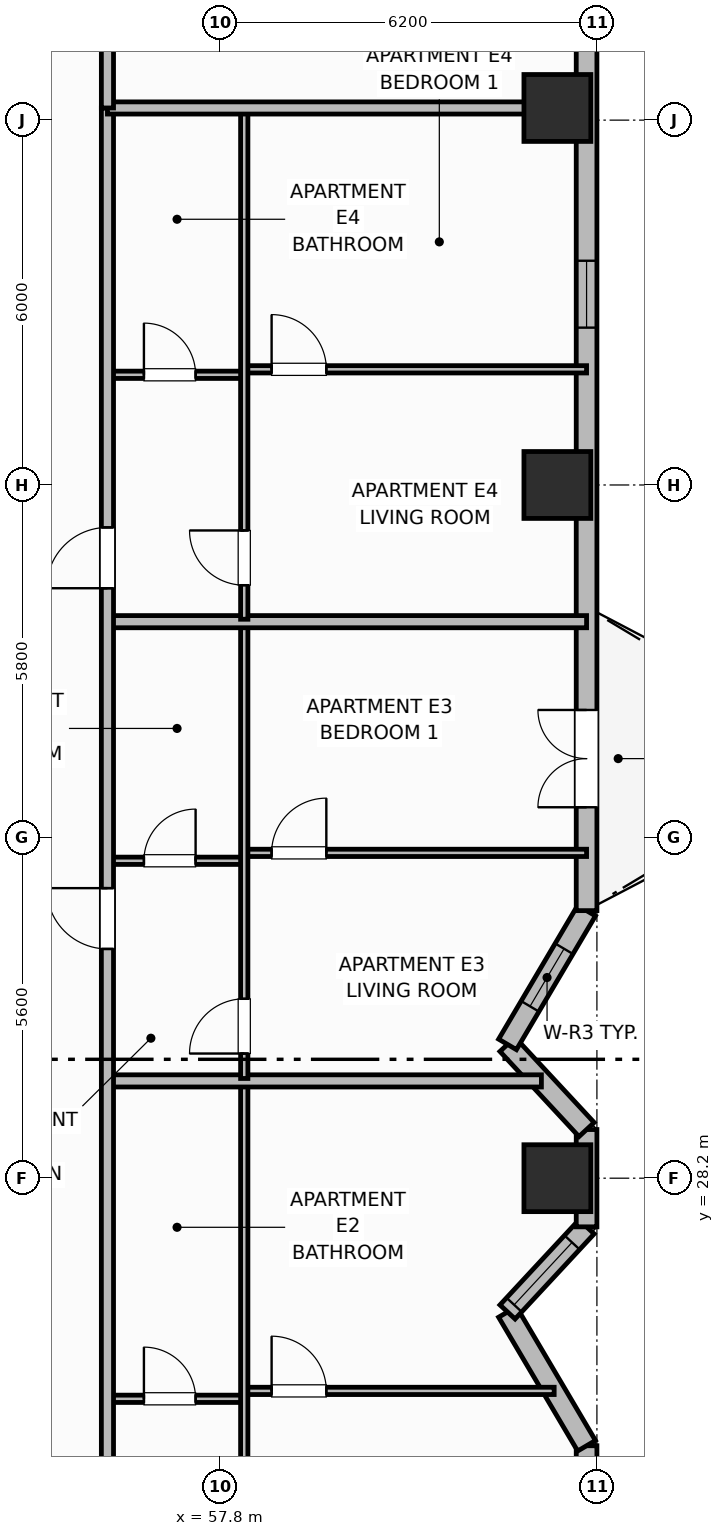
"""IFC4 building model, lengths in metres.
Left out: names, types, materials, properties, quantities, classifications, styles, units other than length and angle.
Written with IfcOpenShell. Run it as: python <this file> out.ifc"""

import sys

from ifc_helpers import new_model, si_unit, direction, frame, frame_2d, origin, origin_2d, place, context, subcontext, project, spatial, rectangle, extrude, element, fill, save


model = new_model("IFC4")
c1 = context("Model", 3, precision=1e-05, world=origin(), true_north=direction((0.0, 1.0)))
c2 = subcontext(c1, "Body", "Model", "MODEL_VIEW")
j1 = project(units=[si_unit("LENGTHUNIT", "METRE"), si_unit("PLANEANGLEUNIT", "RADIAN")], contexts=[c1])
p1 = place(None, origin())
s1 = spatial("IfcSite", under=j1, at=p1, CompositionType="ELEMENT")
p2 = place(p1, origin())
s2 = spatial("IfcBuilding", under=s1, at=p2, CompositionType="ELEMENT")
p3 = place(p2, frame((0.0, 0.0, 106.8)))
s3 = spatial("IfcBuildingStorey", under=s2, at=p3, CompositionType="ELEMENT", Elevation=106.8)
for number, where, z_axis, x_axis in (
    (1, (63.35, 28.2, 0.0), (0.0, 0.0, 1.0), (1.0, 0.0, 0.0)),
    (2, (63.35, 39.6, 0.0), (0.0, 0.0, 1.0), (1.0, 0.0, 0.0)),
    (3, (63.35, 45.8, 0.0), (0.0, 0.0, 1.0), (1.0, 0.0, 0.0)),
):
    element("IfcColumn", number, at=place(p3, frame(where, z_axis=z_axis, x_axis=x_axis)), inside=s3, PredefinedType="COLUMN", context=c2, shape_type="SweptSolid", body=[
        extrude(rectangle(XDim=1.1, YDim=1.1, at=origin_2d()), origin(), (0.0, 0.0, 1.0), 3.7),
    ])
p4 = place(p3, frame((63.83, 9.0, 0.0), z_axis=(0.0, 0.0, 1.0), x_axis=(0.0, 1.0, 0.0)))
e4 = element("IfcWall", 4, at=p4, inside=s3, PredefinedType="SOLIDWALL", context=c2, shape_type="SweptSolid", body=[
    extrude(rectangle(XDim=14.8, YDim=0.34, at=frame_2d((7.4, 0.0))), origin(), (0.0, 0.0, 1.0), 2.7),
])
p5 = place(p4, frame((4.312, 0.0, 0.73)))
e5 = element("IfcOpeningElement", 5, at=p5, cuts=e4, PredefinedType="OPENING", context=c2, shape_type="SweptSolid", body=[
    extrude(rectangle(XDim=1.4, YDim=1.85, at=frame_2d((0.7, 0.925))), frame((0.0, 0.18, 0.0), z_axis=(0.0, -1.0, 0.0), x_axis=(1.0, 0.0, 0.0)), (0.0, 0.0, 1.0), 0.36),
])
p6 = place(p4, frame((8.44, 0.0, 0.69)))
e6 = element("IfcOpeningElement", 6, at=p6, cuts=e4, PredefinedType="OPENING", context=c2, shape_type="SweptSolid", body=[
    extrude(rectangle(XDim=1.4, YDim=1.85, at=frame_2d((0.7, 0.925))), frame((0.0, 0.18, 0.0), z_axis=(0.0, -1.0, 0.0), x_axis=(1.0, 0.0, 0.0)), (0.0, 0.0, 1.0), 0.36),
])
p7 = place(p4, frame((11.762, 0.0, 0.73)))
e7 = element("IfcOpeningElement", 7, at=p7, cuts=e4, PredefinedType="OPENING", context=c2, shape_type="SweptSolid", body=[
    extrude(rectangle(XDim=1.4, YDim=1.85, at=frame_2d((0.7, 0.925))), frame((0.0, 0.18, 0.0), z_axis=(0.0, -1.0, 0.0), x_axis=(1.0, 0.0, 0.0)), (0.0, 0.0, 1.0), 0.36),
])
p8 = place(p3, frame((63.83, 23.8, 0.0), z_axis=(0.0, 0.0, 1.0), x_axis=(-0.508751843651, 0.860913213734, 0.0)))
e8 = element("IfcWall", 8, at=p8, inside=s3, PredefinedType="SOLIDWALL", context=c2, shape_type="SweptSolid", body=[
    extrude(rectangle(XDim=2.555, YDim=0.34, at=frame_2d((1.278, 0.0))), origin(), (0.0, 0.0, 1.0), 2.7),
])
p9 = place(p3, frame((62.53, 26.0, 0.0), z_axis=(0.0, 0.0, 1.0), x_axis=(0.68049031116, 0.732757078722, 0.0)))
e9 = element("IfcWall", 9, at=p9, inside=s3, PredefinedType="SOLIDWALL", context=c2, shape_type="SweptSolid", body=[
    extrude(rectangle(XDim=1.91, YDim=0.34, at=frame_2d((0.955, 0.0))), origin(), (0.0, 0.0, 1.0), 2.7),
])
p10 = place(p9, frame((0.16, 0.0, 0.69)))
e10 = element("IfcOpeningElement", 10, at=p10, cuts=e9, PredefinedType="OPENING", context=c2, shape_type="SweptSolid", body=[
    extrude(rectangle(XDim=1.4, YDim=1.85, at=frame_2d((0.7, 0.925))), frame((0.0, 0.18, 0.0), z_axis=(0.0, -1.0, 0.0), x_axis=(1.0, 0.0, 0.0)), (0.0, 0.0, 1.0), 0.36),
])
p11 = place(p3, frame((63.83, 27.4, 0.0), z_axis=(0.0, 0.0, 1.0), x_axis=(0.0, 1.0, 0.0)))
e11 = element("IfcWall", 11, at=p11, inside=s3, PredefinedType="SOLIDWALL", context=c2, shape_type="SweptSolid", body=[
    extrude(rectangle(XDim=1.6, YDim=0.34, at=frame_2d((0.8, 0.0))), origin(), (0.0, 0.0, 1.0), 2.7),
])
p12 = place(p3, frame((63.83, 29.0, 0.0), z_axis=(0.0, 0.0, 1.0), x_axis=(-0.68049031116, 0.732757078722, 0.0)))
e12 = element("IfcWall", 12, at=p12, inside=s3, PredefinedType="SOLIDWALL", context=c2, shape_type="SweptSolid", body=[
    extrude(rectangle(XDim=1.91, YDim=0.34, at=frame_2d((0.955, 0.0))), origin(), (0.0, 0.0, 1.0), 2.7),
])
p13 = place(p3, frame((62.53, 30.4, 0.0), z_axis=(0.0, 0.0, 1.0), x_axis=(0.508710000703, 0.860937939218, 0.0)))
e13 = element("IfcWall", 13, at=p13, inside=s3, PredefinedType="SOLIDWALL", context=c2, shape_type="SweptSolid", body=[
    extrude(rectangle(XDim=2.556, YDim=0.34, at=frame_2d((1.278, 0.0))), origin(), (0.0, 0.0, 1.0), 2.7),
])
p14 = place(p13, frame((0.728, 0.0, 0.89)))
e14 = element("IfcOpeningElement", 14, at=p14, cuts=e13, PredefinedType="OPENING", context=c2, shape_type="SweptSolid", body=[
    extrude(rectangle(XDim=1.1, YDim=1.65, at=frame_2d((0.55, 0.825))), frame((0.0, 0.18, 0.0), z_axis=(0.0, -1.0, 0.0), x_axis=(1.0, 0.0, 0.0)), (0.0, 0.0, 1.0), 0.36),
])
p15 = place(p3, frame((63.83, 32.6, 0.0), z_axis=(0.0, 0.0, 1.0), x_axis=(0.0, 1.0, 0.0)))
e15 = element("IfcWall", 15, at=p15, inside=s3, PredefinedType="SOLIDWALL", context=c2, shape_type="SweptSolid", body=[
    extrude(rectangle(XDim=14.8, YDim=0.34, at=frame_2d((7.4, 0.0))), origin(), (0.0, 0.0, 1.0), 2.7),
])
p16 = place(p15, frame((1.7, 0.0, 0.0)))
e16 = element("IfcOpeningElement", 16, at=p16, cuts=e15, PredefinedType="OPENING", context=c2, shape_type="SweptSolid", body=[
    extrude(rectangle(XDim=1.6, YDim=2.1, at=frame_2d((0.8, 1.05))), frame((0.0, 0.18, 0.0), z_axis=(0.0, -1.0, 0.0), x_axis=(1.0, 0.0, 0.0)), (0.0, 0.0, 1.0), 0.36),
])
p17 = place(p15, frame((9.587, 0.0, 0.93)))
e17 = element("IfcOpeningElement", 17, at=p17, cuts=e15, PredefinedType="OPENING", context=c2, shape_type="SweptSolid", body=[
    extrude(rectangle(XDim=1.1, YDim=1.65, at=frame_2d((0.55, 0.825))), frame((0.0, 0.18, 0.0), z_axis=(0.0, -1.0, 0.0), x_axis=(1.0, 0.0, 0.0)), (0.0, 0.0, 1.0), 0.36),
])
p18 = place(p3, frame((55.95, 24.572, 0.0), z_axis=(0.0, 0.0, 1.0), x_axis=(1.0, 0.0, 0.0)))
e18 = element("IfcWall", 18, at=p18, inside=s3, PredefinedType="PARTITIONING", context=c2, shape_type="SweptSolid", body=[
    extrude(rectangle(XDim=2.25, YDim=0.12, at=frame_2d((1.125, 0.0))), origin(), (0.0, 0.0, 1.0), 2.53),
])
p19 = place(p18, frame((0.6, 0.0, 0.0)))
e19 = element("IfcOpeningElement", 19, at=p19, cuts=e18, PredefinedType="OPENING", context=c2, shape_type="SweptSolid", body=[
    extrude(rectangle(XDim=0.85, YDim=2.1, at=frame_2d((0.425, 1.05))), frame((0.0, 0.07, 0.0), z_axis=(0.0, -1.0, 0.0), x_axis=(1.0, 0.0, 0.0)), (0.0, 0.0, 1.0), 0.14),
])
p20 = place(p3, frame((58.2, 24.702, 0.0), z_axis=(0.0, 0.0, 1.0), x_axis=(1.0, 0.0, 0.0)))
e20 = element("IfcWall", 20, at=p20, inside=s3, PredefinedType="PARTITIONING", context=c2, shape_type="SweptSolid", body=[
    extrude(rectangle(XDim=5.097, YDim=0.12, at=frame_2d((2.549, 0.0))), origin(), (0.0, 0.0, 1.0), 2.53),
])
p21 = place(p20, frame((0.45, 0.0, 0.0)))
e21 = element("IfcOpeningElement", 21, at=p21, cuts=e20, PredefinedType="OPENING", context=c2, shape_type="SweptSolid", body=[
    extrude(rectangle(XDim=0.9, YDim=2.1, at=frame_2d((0.45, 1.05))), frame((0.0, 0.07, 0.0), z_axis=(0.0, -1.0, 0.0), x_axis=(1.0, 0.0, 0.0)), (0.0, 0.0, 1.0), 0.14),
])
p22 = place(p3, frame((58.2, 19.792, 0.0), z_axis=(0.0, 0.0, 1.0), x_axis=(0.0, 1.0, 0.0)))
e22 = element("IfcWall", 22, at=p22, inside=s3, PredefinedType="PARTITIONING", context=c2, shape_type="SweptSolid", body=[
    extrude(rectangle(XDim=9.968, YDim=0.12, at=frame_2d((4.984, 0.0))), origin(), (0.0, 0.0, 1.0), 2.53),
])
p23 = place(p22, frame((0.41, 0.0, 0.0)))
e23 = element("IfcOpeningElement", 23, at=p23, cuts=e22, PredefinedType="OPENING", context=c2, shape_type="SweptSolid", body=[
    extrude(rectangle(XDim=0.9, YDim=2.1, at=frame_2d((0.45, 1.05))), frame((0.0, 0.07, 0.0), z_axis=(0.0, -1.0, 0.0), x_axis=(1.0, 0.0, 0.0)), (0.0, 0.0, 1.0), 0.14),
])
p24 = place(p3, frame((55.95, 29.8, 0.0), z_axis=(0.0, 0.0, 1.0), x_axis=(1.0, 0.0, 0.0)))
e24 = element("IfcWall", 24, at=p24, inside=s3, PredefinedType="PARTITIONING", context=c2, shape_type="SweptSolid", body=[
    extrude(rectangle(XDim=7.137, YDim=0.2, at=frame_2d((3.569, 0.0))), origin(), (0.0, 0.0, 1.0), 2.53),
])
p25 = place(p3, frame((55.95, 33.42, 0.0), z_axis=(0.0, 0.0, 1.0), x_axis=(1.0, 0.0, 0.0)))
e25 = element("IfcWall", 25, at=p25, inside=s3, PredefinedType="PARTITIONING", context=c2, shape_type="SweptSolid", body=[
    extrude(rectangle(XDim=2.25, YDim=0.12, at=frame_2d((1.125, 0.0))), origin(), (0.0, 0.0, 1.0), 2.53),
])
p26 = place(p25, frame((0.6, 0.0, 0.0)))
e26 = element("IfcOpeningElement", 26, at=p26, cuts=e25, PredefinedType="OPENING", context=c2, shape_type="SweptSolid", body=[
    extrude(rectangle(XDim=0.85, YDim=2.1, at=frame_2d((0.425, 1.05))), frame((0.0, 0.07, 0.0), z_axis=(0.0, -1.0, 0.0), x_axis=(1.0, 0.0, 0.0)), (0.0, 0.0, 1.0), 0.14),
])
p27 = place(p3, frame((58.2, 33.55, 0.0), z_axis=(0.0, 0.0, 1.0), x_axis=(1.0, 0.0, 0.0)))
e27 = element("IfcWall", 27, at=p27, inside=s3, PredefinedType="PARTITIONING", context=c2, shape_type="SweptSolid", body=[
    extrude(rectangle(XDim=5.63, YDim=0.12, at=frame_2d((2.815, 0.0))), origin(), (0.0, 0.0, 1.0), 2.53),
])
p28 = place(p27, frame((0.45, 0.0, 0.0)))
e28 = element("IfcOpeningElement", 28, at=p28, cuts=e27, PredefinedType="OPENING", context=c2, shape_type="SweptSolid", body=[
    extrude(rectangle(XDim=0.9, YDim=2.1, at=frame_2d((0.45, 1.05))), frame((0.0, 0.07, 0.0), z_axis=(0.0, -1.0, 0.0), x_axis=(1.0, 0.0, 0.0)), (0.0, 0.0, 1.0), 0.14),
])
p29 = place(p3, frame((58.2, 29.84, 0.0), z_axis=(0.0, 0.0, 1.0), x_axis=(0.0, 1.0, 0.0)))
e29 = element("IfcWall", 29, at=p29, inside=s3, PredefinedType="PARTITIONING", context=c2, shape_type="SweptSolid", body=[
    extrude(rectangle(XDim=7.472, YDim=0.12, at=frame_2d((3.736, 0.0))), origin(), (0.0, 0.0, 1.0), 2.53),
])
p30 = place(p29, frame((0.41, 0.0, 0.0)))
e30 = element("IfcOpeningElement", 30, at=p30, cuts=e29, PredefinedType="OPENING", context=c2, shape_type="SweptSolid", body=[
    extrude(rectangle(XDim=0.9, YDim=2.1, at=frame_2d((0.45, 1.05))), frame((0.0, 0.07, 0.0), z_axis=(0.0, -1.0, 0.0), x_axis=(1.0, 0.0, 0.0)), (0.0, 0.0, 1.0), 0.14),
])
p31 = place(p3, frame((55.95, 37.352, 0.0), z_axis=(0.0, 0.0, 1.0), x_axis=(1.0, 0.0, 0.0)))
e31 = element("IfcWall", 31, at=p31, inside=s3, PredefinedType="PARTITIONING", context=c2, shape_type="SweptSolid", body=[
    extrude(rectangle(XDim=7.88, YDim=0.2, at=frame_2d((3.94, 0.0))), origin(), (0.0, 0.0, 1.0), 2.53),
])
p32 = place(p3, frame((55.95, 41.412, 0.0), z_axis=(0.0, 0.0, 1.0), x_axis=(1.0, 0.0, 0.0)))
e32 = element("IfcWall", 32, at=p32, inside=s3, PredefinedType="PARTITIONING", context=c2, shape_type="SweptSolid", body=[
    extrude(rectangle(XDim=2.25, YDim=0.12, at=frame_2d((1.125, 0.0))), origin(), (0.0, 0.0, 1.0), 2.53),
])
p33 = place(p32, frame((0.6, 0.0, 0.0)))
e33 = element("IfcOpeningElement", 33, at=p33, cuts=e32, PredefinedType="OPENING", context=c2, shape_type="SweptSolid", body=[
    extrude(rectangle(XDim=0.85, YDim=2.1, at=frame_2d((0.425, 1.05))), frame((0.0, 0.07, 0.0), z_axis=(0.0, -1.0, 0.0), x_axis=(1.0, 0.0, 0.0)), (0.0, 0.0, 1.0), 0.14),
])
p34 = place(p3, frame((58.2, 41.502, 0.0), z_axis=(0.0, 0.0, 1.0), x_axis=(1.0, 0.0, 0.0)))
e34 = element("IfcWall", 34, at=p34, inside=s3, PredefinedType="PARTITIONING", context=c2, shape_type="SweptSolid", body=[
    extrude(rectangle(XDim=5.63, YDim=0.12, at=frame_2d((2.815, 0.0))), origin(), (0.0, 0.0, 1.0), 2.53),
])
p35 = place(p34, frame((0.45, 0.0, 0.0)))
e35 = element("IfcOpeningElement", 35, at=p35, cuts=e34, PredefinedType="OPENING", context=c2, shape_type="SweptSolid", body=[
    extrude(rectangle(XDim=0.9, YDim=2.1, at=frame_2d((0.45, 1.05))), frame((0.0, 0.07, 0.0), z_axis=(0.0, -1.0, 0.0), x_axis=(1.0, 0.0, 0.0)), (0.0, 0.0, 1.0), 0.14),
])
p36 = place(p3, frame((58.2, 37.392, 0.0), z_axis=(0.0, 0.0, 1.0), x_axis=(0.0, 1.0, 0.0)))
e36 = element("IfcWall", 36, at=p36, inside=s3, PredefinedType="PARTITIONING", context=c2, shape_type="SweptSolid", body=[
    extrude(rectangle(XDim=8.368, YDim=0.12, at=frame_2d((4.184, 0.0))), origin(), (0.0, 0.0, 1.0), 2.53),
])
p37 = place(p36, frame((0.56, 0.0, 0.0)))
e37 = element("IfcOpeningElement", 37, at=p37, cuts=e36, PredefinedType="OPENING", context=c2, shape_type="SweptSolid", body=[
    extrude(rectangle(XDim=0.9, YDim=2.1, at=frame_2d((0.45, 1.05))), frame((0.0, 0.07, 0.0), z_axis=(0.0, -1.0, 0.0), x_axis=(1.0, 0.0, 0.0)), (0.0, 0.0, 1.0), 0.14),
])
p38 = place(p3, frame((55.95, 10.6, 0.0), z_axis=(0.0, 0.0, 1.0), x_axis=(0.0, 1.0, 0.0)))
e38 = element("IfcWall", 38, at=p38, inside=s3, PredefinedType="PARTITIONING", context=c2, shape_type="SweptSolid", body=[
    extrude(rectangle(XDim=35.2, YDim=0.2, at=frame_2d((17.6, 0.0))), origin(), (0.0, 0.0, 1.0), 2.53),
])
p39 = place(p38, frame((2.65, 0.0, 0.0)))
e39 = element("IfcOpeningElement", 39, at=p39, cuts=e38, PredefinedType="OPENING", context=c2, shape_type="SweptSolid", body=[
    extrude(rectangle(XDim=1.0, YDim=2.15, at=frame_2d((0.5, 1.075))), frame((0.0, 0.11, 0.0), z_axis=(0.0, -1.0, 0.0), x_axis=(1.0, 0.0, 0.0)), (0.0, 0.0, 1.0), 0.22),
])
p40 = place(p38, frame((11.352, 0.0, 0.0)))
e40 = element("IfcOpeningElement", 40, at=p40, cuts=e38, PredefinedType="OPENING", context=c2, shape_type="SweptSolid", body=[
    extrude(rectangle(XDim=1.0, YDim=2.15, at=frame_2d((0.5, 1.075))), frame((0.0, 0.11, 0.0), z_axis=(0.0, -1.0, 0.0), x_axis=(1.0, 0.0, 0.0)), (0.0, 0.0, 1.0), 0.22),
])
p41 = place(p38, frame((21.37, 0.0, 0.0)))
e41 = element("IfcOpeningElement", 41, at=p41, cuts=e38, PredefinedType="OPENING", context=c2, shape_type="SweptSolid", body=[
    extrude(rectangle(XDim=1.0, YDim=2.15, at=frame_2d((0.5, 1.075))), frame((0.0, 0.11, 0.0), z_axis=(0.0, -1.0, 0.0), x_axis=(1.0, 0.0, 0.0)), (0.0, 0.0, 1.0), 0.22),
])
p42 = place(p38, frame((27.302, 0.0, 0.0)))
e42 = element("IfcOpeningElement", 42, at=p42, cuts=e38, PredefinedType="OPENING", context=c2, shape_type="SweptSolid", body=[
    extrude(rectangle(XDim=1.0, YDim=2.15, at=frame_2d((0.5, 1.075))), frame((0.0, 0.11, 0.0), z_axis=(0.0, -1.0, 0.0), x_axis=(1.0, 0.0, 0.0)), (0.0, 0.0, 1.0), 0.22),
])
p43 = place(p3, frame((55.95, 45.8, 0.0), z_axis=(0.0, 0.0, 1.0), x_axis=(1.0, 0.0, 0.0)))
e43 = element("IfcWall", 43, at=p43, inside=s3, PredefinedType="PARTITIONING", context=c2, shape_type="SweptSolid", body=[
    extrude(rectangle(XDim=7.46, YDim=0.2, at=frame_2d((3.73, 0.0))), origin(), (0.0, 0.0, 1.0), 2.53),
])
p44 = place(p3, frame((55.95, 45.8, 0.0), z_axis=(0.0, 0.0, 1.0), x_axis=(0.0, 1.0, 0.0)))
e44 = element("IfcWall", 44, at=p44, inside=s3, PredefinedType="PARTITIONING", context=c2, shape_type="SweptSolid", body=[
    extrude(rectangle(XDim=5.63, YDim=0.2, at=frame_2d((2.815, 0.0))), origin(), (0.0, 0.0, 1.0), 2.53),
])
p45 = place(p10, origin())
e45 = element("IfcWindow", 45, at=p45, inside=s3, PartitioningType="SINGLE_PANEL", PredefinedType="WINDOW", context=c2, shape_type="SweptSolid", body=[
    extrude(rectangle(XDim=1.4, YDim=1.85, at=frame_2d((0.7, 0.925))), frame((0.0, 0.03, 0.0), z_axis=(0.0, -1.0, 0.0), x_axis=(1.0, 0.0, 0.0)), (0.0, 0.0, 1.0), 0.06),
])
fill(e10, e45)
p46 = place(p14, origin())
e46 = element("IfcWindow", 46, at=p46, inside=s3, PartitioningType="SINGLE_PANEL", PredefinedType="WINDOW", context=c2, shape_type="SweptSolid", body=[
    extrude(rectangle(XDim=1.1, YDim=1.65, at=frame_2d((0.55, 0.825))), frame((0.0, 0.03, 0.0), z_axis=(0.0, -1.0, 0.0), x_axis=(1.0, 0.0, 0.0)), (0.0, 0.0, 1.0), 0.06),
])
fill(e14, e46)
p47 = place(p16, origin())
e47 = element("IfcDoor", 47, at=p47, inside=s3, OperationType="DOUBLE_DOOR_SINGLE_SWING", PredefinedType="DOOR", context=c2, shape_type="SweptSolid", body=[
    extrude(rectangle(XDim=1.6, YDim=2.1, at=frame_2d((0.8, 1.05))), frame((0.0, 0.025, 0.0), z_axis=(0.0, -1.0, 0.0), x_axis=(1.0, 0.0, 0.0)), (0.0, 0.0, 1.0), 0.05),
])
fill(e16, e47)
p48 = place(p17, origin())
e48 = element("IfcWindow", 48, at=p48, inside=s3, PartitioningType="SINGLE_PANEL", PredefinedType="WINDOW", context=c2, shape_type="SweptSolid", body=[
    extrude(rectangle(XDim=1.1, YDim=1.65, at=frame_2d((0.55, 0.825))), frame((0.0, 0.03, 0.0), z_axis=(0.0, -1.0, 0.0), x_axis=(1.0, 0.0, 0.0)), (0.0, 0.0, 1.0), 0.06),
])
fill(e17, e48)
p49 = place(p19, origin())
e49 = element("IfcDoor", 49, at=p49, inside=s3, OperationType="SINGLE_SWING_LEFT", PredefinedType="DOOR", context=c2, shape_type="SweptSolid", body=[
    extrude(rectangle(XDim=0.85, YDim=2.1, at=frame_2d((0.425, 1.05))), frame((0.0, 0.025, 0.0), z_axis=(0.0, -1.0, 0.0), x_axis=(1.0, 0.0, 0.0)), (0.0, 0.0, 1.0), 0.05),
])
fill(e19, e49)
p50 = place(p21, origin())
e50 = element("IfcDoor", 50, at=p50, inside=s3, OperationType="SINGLE_SWING_LEFT", PredefinedType="DOOR", context=c2, shape_type="SweptSolid", body=[
    extrude(rectangle(XDim=0.9, YDim=2.1, at=frame_2d((0.45, 1.05))), frame((0.0, 0.025, 0.0), z_axis=(0.0, -1.0, 0.0), x_axis=(1.0, 0.0, 0.0)), (0.0, 0.0, 1.0), 0.05),
])
fill(e21, e50)
p51 = place(p26, origin())
e51 = element("IfcDoor", 51, at=p51, inside=s3, OperationType="SINGLE_SWING_RIGHT", PredefinedType="DOOR", context=c2, shape_type="SweptSolid", body=[
    extrude(rectangle(XDim=0.85, YDim=2.1, at=frame_2d((0.425, 1.05))), frame((0.0, 0.025, 0.0), z_axis=(0.0, -1.0, 0.0), x_axis=(1.0, 0.0, 0.0)), (0.0, 0.0, 1.0), 0.05),
])
fill(e26, e51)
p52 = place(p28, origin())
e52 = element("IfcDoor", 52, at=p52, inside=s3, OperationType="SINGLE_SWING_RIGHT", PredefinedType="DOOR", context=c2, shape_type="SweptSolid", body=[
    extrude(rectangle(XDim=0.9, YDim=2.1, at=frame_2d((0.45, 1.05))), frame((0.0, 0.025, 0.0), z_axis=(0.0, -1.0, 0.0), x_axis=(1.0, 0.0, 0.0)), (0.0, 0.0, 1.0), 0.05),
])
fill(e28, e52)
p53 = place(p30, origin())
e53 = element("IfcDoor", 53, at=p53, inside=s3, OperationType="SINGLE_SWING_LEFT", PredefinedType="DOOR", context=c2, shape_type="SweptSolid", body=[
    extrude(rectangle(XDim=0.9, YDim=2.1, at=frame_2d((0.45, 1.05))), frame((0.0, 0.025, 0.0), z_axis=(0.0, -1.0, 0.0), x_axis=(1.0, 0.0, 0.0)), (0.0, 0.0, 1.0), 0.05),
])
fill(e30, e53)
p54 = place(p33, origin())
e54 = element("IfcDoor", 54, at=p54, inside=s3, OperationType="SINGLE_SWING_LEFT", PredefinedType="DOOR", context=c2, shape_type="SweptSolid", body=[
    extrude(rectangle(XDim=0.85, YDim=2.1, at=frame_2d((0.425, 1.05))), frame((0.0, 0.025, 0.0), z_axis=(0.0, -1.0, 0.0), x_axis=(1.0, 0.0, 0.0)), (0.0, 0.0, 1.0), 0.05),
])
fill(e33, e54)
p55 = place(p35, origin())
e55 = element("IfcDoor", 55, at=p55, inside=s3, OperationType="SINGLE_SWING_LEFT", PredefinedType="DOOR", context=c2, shape_type="SweptSolid", body=[
    extrude(rectangle(XDim=0.9, YDim=2.1, at=frame_2d((0.45, 1.05))), frame((0.0, 0.025, 0.0), z_axis=(0.0, -1.0, 0.0), x_axis=(1.0, 0.0, 0.0)), (0.0, 0.0, 1.0), 0.05),
])
fill(e35, e55)
p56 = place(p37, origin())
e56 = element("IfcDoor", 56, at=p56, inside=s3, OperationType="SINGLE_SWING_RIGHT", PredefinedType="DOOR", context=c2, shape_type="SweptSolid", body=[
    extrude(rectangle(XDim=0.9, YDim=2.1, at=frame_2d((0.45, 1.05))), frame((0.0, 0.025, 0.0), z_axis=(0.0, -1.0, 0.0), x_axis=(1.0, 0.0, 0.0)), (0.0, 0.0, 1.0), 0.05),
])
fill(e37, e56)
p57 = place(p41, origin())
e57 = element("IfcDoor", 57, at=p57, inside=s3, OperationType="SINGLE_SWING_RIGHT", PredefinedType="DOOR", context=c2, shape_type="SweptSolid", body=[
    extrude(rectangle(XDim=1.0, YDim=2.15, at=frame_2d((0.5, 1.075))), frame((0.0, 0.025, 0.0), z_axis=(0.0, -1.0, 0.0), x_axis=(1.0, 0.0, 0.0)), (0.0, 0.0, 1.0), 0.05),
])
fill(e41, e57)
p58 = place(p42, origin())
e58 = element("IfcDoor", 58, at=p58, inside=s3, OperationType="SINGLE_SWING_LEFT", PredefinedType="DOOR", context=c2, shape_type="SweptSolid", body=[
    extrude(rectangle(XDim=1.0, YDim=2.15, at=frame_2d((0.5, 1.075))), frame((0.0, 0.025, 0.0), z_axis=(0.0, -1.0, 0.0), x_axis=(1.0, 0.0, 0.0)), (0.0, 0.0, 1.0), 0.05),
])
fill(e42, e58)
save(model, sys.argv[1])
